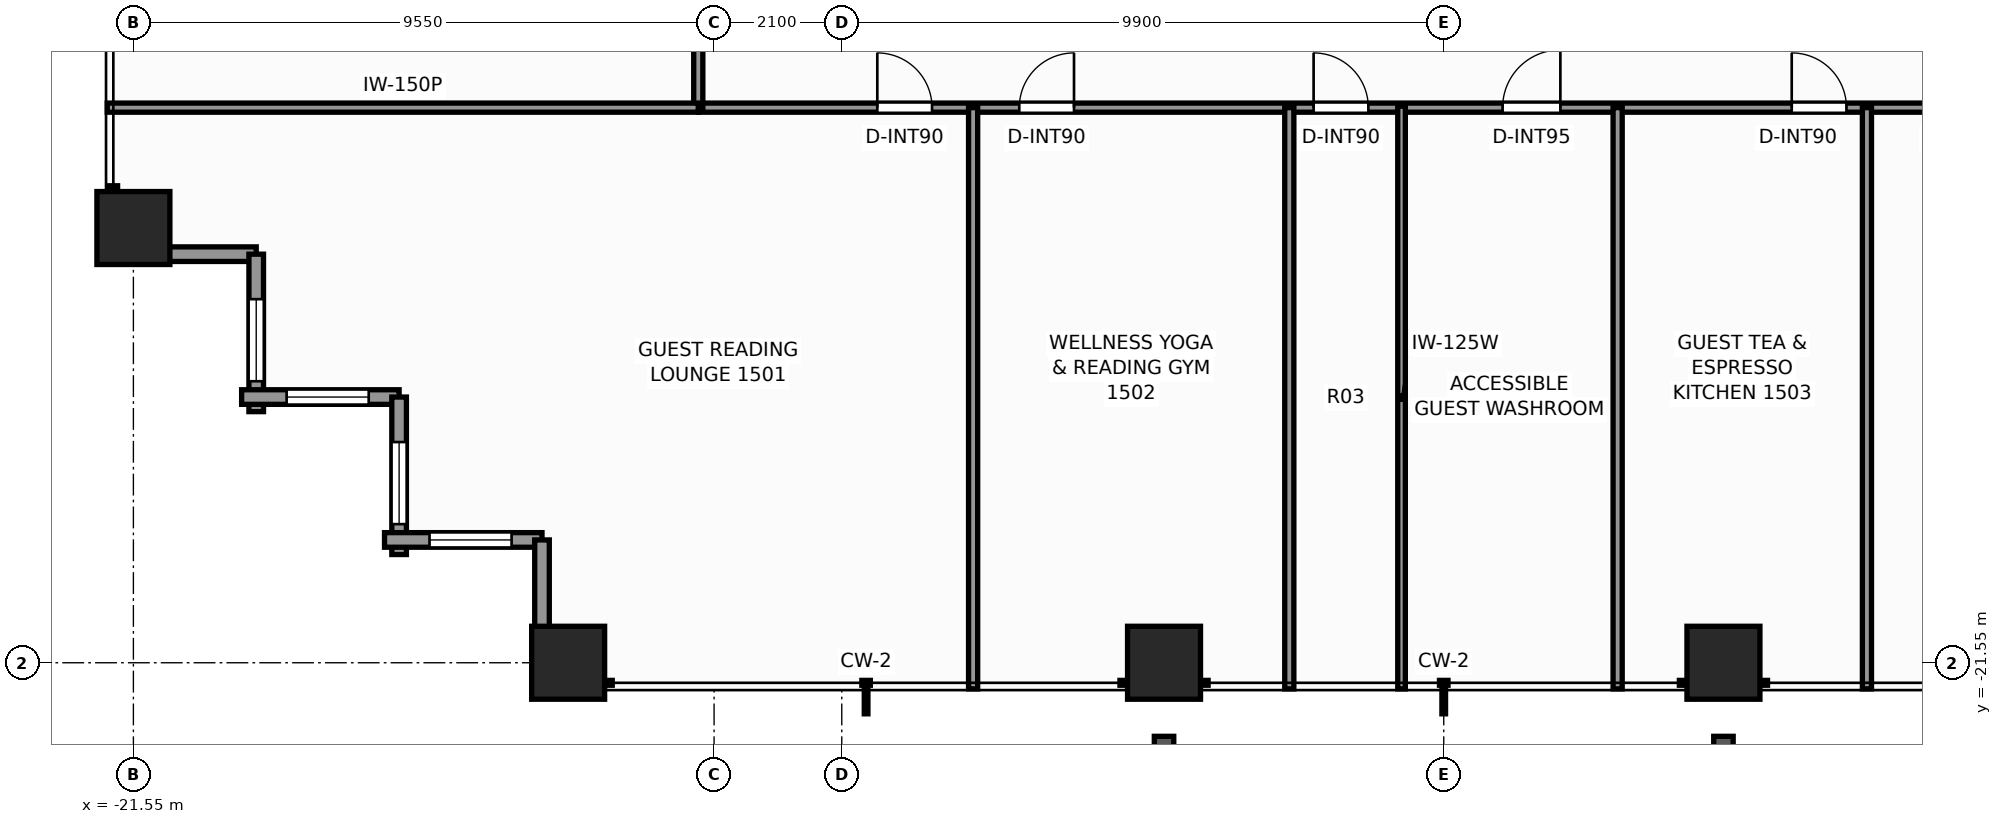
"""IFC4 building model, lengths in metres.
Left out: names, types, materials, properties, quantities, classifications, styles, units other than length and angle.
Written with IfcOpenShell. Run it as: python <this file> out.ifc"""

import sys

from ifc_helpers import new_model, si_unit, direction, frame, frame_2d, origin, origin_2d, place, context, subcontext, project, spatial, rectangle, extrude, element, fill, save


model = new_model("IFC4")
c1 = context("Model", 3, precision=1e-05, world=origin(), true_north=direction((0.0, 1.0)))
c2 = subcontext(c1, "Body", "Model", "MODEL_VIEW")
j1 = project(units=[si_unit("LENGTHUNIT", "METRE"), si_unit("PLANEANGLEUNIT", "RADIAN")], contexts=[c1])
p1 = place(None, origin())
s1 = spatial("IfcSite", under=j1, at=p1, CompositionType="ELEMENT")
p2 = place(p1, origin())
s2 = spatial("IfcBuilding", under=s1, at=p2, CompositionType="ELEMENT")
p3 = place(p2, frame((0.0, 0.0, 53.5)))
s3 = spatial("IfcBuildingStorey", under=s2, at=p3, CompositionType="ELEMENT", Elevation=53.5)
for number, where, z_axis, x_axis in (
    (1, (-14.4, -21.55, 0.0), (0.0, 0.0, 1.0), (1.0, 0.0, 0.0)),
    (2, (-4.6, -21.55, 0.0), (0.0, 0.0, 1.0), (1.0, 0.0, 0.0)),
    (3, (4.6, -21.55, 0.0), (0.0, 0.0, 1.0), (1.0, 0.0, 0.0)),
    (4, (-21.55, -14.4, 0.0), (0.0, 0.0, 1.0), (1.0, 0.0, 0.0)),
):
    element("IfcColumn", number, at=place(p3, frame(where, z_axis=z_axis, x_axis=x_axis)), inside=s3, PredefinedType="COLUMN", context=c2, shape_type="SweptSolid", body=[
        extrude(rectangle(XDim=1.2, YDim=1.2, at=origin_2d()), origin(), (0.0, 0.0, 1.0), 3.3),
    ])
p4 = place(p3, frame((-19.53, -14.83, 0.0), z_axis=(0.0, 0.0, 1.0), x_axis=(-1.0, 0.0, 0.0)))
e5 = element("IfcWall", 5, at=p4, inside=s3, PredefinedType="STANDARD", context=c2, shape_type="SweptSolid", body=[
    extrude(rectangle(XDim=2.59, YDim=0.24, at=frame_2d((1.295, 0.0))), origin(), (0.0, 0.0, 1.0), 2.439),
])
p5 = place(p3, frame((-19.53, -17.42, 0.0), z_axis=(0.0, 0.0, 1.0), x_axis=(0.0, 1.0, 0.0)))
e6 = element("IfcWall", 6, at=p5, inside=s3, PredefinedType="STANDARD", context=c2, shape_type="SweptSolid", body=[
    extrude(rectangle(XDim=2.59, YDim=0.24, at=frame_2d((1.295, 0.0))), origin(), (0.0, 0.0, 1.0), 2.439),
])
p6 = place(p5, frame((0.5, 0.0, 0.65)))
e7 = element("IfcOpeningElement", 7, at=p6, cuts=e6, PredefinedType="OPENING", context=c2, shape_type="SweptSolid", body=[
    extrude(rectangle(XDim=1.35, YDim=1.55, at=frame_2d((0.675, 0.775))), frame((0.0, 0.13, 0.0), z_axis=(0.0, -1.0, 0.0), x_axis=(1.0, 0.0, 0.0)), (0.0, 0.0, 1.0), 0.26),
])
p7 = place(p3, frame((-17.18, -17.18, 0.0), z_axis=(0.0, 0.0, 1.0), x_axis=(-1.0, 0.0, 0.0)))
e8 = element("IfcWall", 8, at=p7, inside=s3, PredefinedType="STANDARD", context=c2, shape_type="SweptSolid", body=[
    extrude(rectangle(XDim=2.59, YDim=0.24, at=frame_2d((1.295, 0.0))), origin(), (0.0, 0.0, 1.0), 2.439),
])
p8 = place(p7, frame((0.5, 0.0, 0.65)))
e9 = element("IfcOpeningElement", 9, at=p8, cuts=e8, PredefinedType="OPENING", context=c2, shape_type="SweptSolid", body=[
    extrude(rectangle(XDim=1.35, YDim=1.55, at=frame_2d((0.675, 0.775))), frame((0.0, 0.13, 0.0), z_axis=(0.0, -1.0, 0.0), x_axis=(1.0, 0.0, 0.0)), (0.0, 0.0, 1.0), 0.26),
])
p9 = place(p3, frame((-17.18, -19.77, 0.0), z_axis=(0.0, 0.0, 1.0), x_axis=(0.0, 1.0, 0.0)))
e10 = element("IfcWall", 10, at=p9, inside=s3, PredefinedType="STANDARD", context=c2, shape_type="SweptSolid", body=[
    extrude(rectangle(XDim=2.59, YDim=0.24, at=frame_2d((1.295, 0.0))), origin(), (0.0, 0.0, 1.0), 2.439),
])
p10 = place(p9, frame((0.5, 0.0, 0.65)))
e11 = element("IfcOpeningElement", 11, at=p10, cuts=e10, PredefinedType="OPENING", context=c2, shape_type="SweptSolid", body=[
    extrude(rectangle(XDim=1.35, YDim=1.55, at=frame_2d((0.675, 0.775))), frame((0.0, 0.13, 0.0), z_axis=(0.0, -1.0, 0.0), x_axis=(1.0, 0.0, 0.0)), (0.0, 0.0, 1.0), 0.26),
])
p11 = place(p3, frame((-14.83, -19.53, 0.0), z_axis=(0.0, 0.0, 1.0), x_axis=(-1.0, 0.0, 0.0)))
e12 = element("IfcWall", 12, at=p11, inside=s3, PredefinedType="STANDARD", context=c2, shape_type="SweptSolid", body=[
    extrude(rectangle(XDim=2.59, YDim=0.24, at=frame_2d((1.295, 0.0))), origin(), (0.0, 0.0, 1.0), 2.439),
])
p12 = place(p11, frame((0.5, 0.0, 0.65)))
e13 = element("IfcOpeningElement", 13, at=p12, cuts=e12, PredefinedType="OPENING", context=c2, shape_type="SweptSolid", body=[
    extrude(rectangle(XDim=1.35, YDim=1.55, at=frame_2d((0.675, 0.775))), frame((0.0, 0.13, 0.0), z_axis=(0.0, -1.0, 0.0), x_axis=(1.0, 0.0, 0.0)), (0.0, 0.0, 1.0), 0.26),
])
p13 = place(p3, frame((-14.83, -22.12, 0.0), z_axis=(0.0, 0.0, 1.0), x_axis=(0.0, 1.0, 0.0)))
e14 = element("IfcWall", 14, at=p13, inside=s3, PredefinedType="STANDARD", context=c2, shape_type="SweptSolid", body=[
    extrude(rectangle(XDim=2.59, YDim=0.24, at=frame_2d((1.295, 0.0))), origin(), (0.0, 0.0, 1.0), 2.439),
])
p14 = place(p3, frame((-12.26, -12.42, 0.0), z_axis=(0.0, 0.0, 1.0), x_axis=(1.0, 0.0, 0.0)))
e15 = element("IfcWall", 15, at=p14, inside=s3, PredefinedType="PARTITIONING", context=c2, shape_type="SweptSolid", body=[
    extrude(rectangle(XDim=24.84, YDim=0.15, at=frame_2d((12.42, 0.0))), origin(), (0.0, 0.0, 1.0), 2.272),
])
p15 = place(p14, frame((2.944, 0.0, 0.0)))
e16 = element("IfcOpeningElement", 16, at=p15, cuts=e15, PredefinedType="OPENING", context=c2, shape_type="SweptSolid", body=[
    extrude(rectangle(XDim=0.9, YDim=2.06, at=frame_2d((0.45, 1.03))), frame((0.0, 0.085, 0.0), z_axis=(0.0, -1.0, 0.0), x_axis=(1.0, 0.0, 0.0)), (0.0, 0.0, 1.0), 0.17),
])
p16 = place(p14, frame((5.279, 0.0, 0.0)))
e17 = element("IfcOpeningElement", 17, at=p16, cuts=e15, PredefinedType="OPENING", context=c2, shape_type="SweptSolid", body=[
    extrude(rectangle(XDim=0.9, YDim=2.06, at=frame_2d((0.45, 1.03))), frame((0.0, 0.085, 0.0), z_axis=(0.0, -1.0, 0.0), x_axis=(1.0, 0.0, 0.0)), (0.0, 0.0, 1.0), 0.17),
])
p17 = place(p14, frame((10.12, 0.0, 0.0)))
e18 = element("IfcOpeningElement", 18, at=p17, cuts=e15, PredefinedType="OPENING", context=c2, shape_type="SweptSolid", body=[
    extrude(rectangle(XDim=0.9, YDim=2.06, at=frame_2d((0.45, 1.03))), frame((0.0, 0.085, 0.0), z_axis=(0.0, -1.0, 0.0), x_axis=(1.0, 0.0, 0.0)), (0.0, 0.0, 1.0), 0.17),
])
p18 = place(p14, frame((13.228, 0.0, 0.0)))
e19 = element("IfcOpeningElement", 19, at=p18, cuts=e15, PredefinedType="OPENING", context=c2, shape_type="SweptSolid", body=[
    extrude(rectangle(XDim=0.95, YDim=2.06, at=frame_2d((0.475, 1.03))), frame((0.0, 0.085, 0.0), z_axis=(0.0, -1.0, 0.0), x_axis=(1.0, 0.0, 0.0)), (0.0, 0.0, 1.0), 0.17),
])
p19 = place(p14, frame((17.983, 0.0, 0.0)))
e20 = element("IfcOpeningElement", 20, at=p19, cuts=e15, PredefinedType="OPENING", context=c2, shape_type="SweptSolid", body=[
    extrude(rectangle(XDim=0.9, YDim=2.06, at=frame_2d((0.45, 1.03))), frame((0.0, 0.085, 0.0), z_axis=(0.0, -1.0, 0.0), x_axis=(1.0, 0.0, 0.0)), (0.0, 0.0, 1.0), 0.17),
])
p20 = place(p14, frame((20.318, 0.0, 0.0)))
e21 = element("IfcOpeningElement", 21, at=p20, cuts=e15, PredefinedType="OPENING", context=c2, shape_type="SweptSolid", body=[
    extrude(rectangle(XDim=0.9, YDim=2.06, at=frame_2d((0.45, 1.03))), frame((0.0, 0.085, 0.0), z_axis=(0.0, -1.0, 0.0), x_axis=(1.0, 0.0, 0.0)), (0.0, 0.0, 1.0), 0.17),
])
p21 = place(p3, frame((-12.26, -12.42, 0.0), z_axis=(0.0, 0.0, 1.0), x_axis=(0.0, 1.0, 0.0)))
e22 = element("IfcWall", 22, at=p21, inside=s3, PredefinedType="PARTITIONING", context=c2, shape_type="SweptSolid", body=[
    extrude(rectangle(XDim=24.84, YDim=0.15, at=frame_2d((12.42, 0.0))), origin(), (0.0, 0.0, 1.0), 2.272),
])
p22 = place(p21, frame((3.551, 0.0, 0.0)))
e23 = element("IfcOpeningElement", 23, at=p22, cuts=e22, PredefinedType="OPENING", context=c2, shape_type="SweptSolid", body=[
    extrude(rectangle(XDim=0.95, YDim=2.06, at=frame_2d((0.475, 1.03))), frame((0.0, 0.085, 0.0), z_axis=(0.0, -1.0, 0.0), x_axis=(1.0, 0.0, 0.0)), (0.0, 0.0, 1.0), 0.17),
])
p23 = place(p21, frame((9.94, 0.0, 0.0)))
e24 = element("IfcOpeningElement", 24, at=p23, cuts=e22, PredefinedType="OPENING", context=c2, shape_type="SweptSolid", body=[
    extrude(rectangle(XDim=0.9, YDim=2.06, at=frame_2d((0.45, 1.03))), frame((0.0, 0.085, 0.0), z_axis=(0.0, -1.0, 0.0), x_axis=(1.0, 0.0, 0.0)), (0.0, 0.0, 1.0), 0.17),
])
p24 = place(p21, frame((19.741, 0.0, 0.0)))
e25 = element("IfcOpeningElement", 25, at=p24, cuts=e22, PredefinedType="OPENING", context=c2, shape_type="SweptSolid", body=[
    extrude(rectangle(XDim=0.95, YDim=2.06, at=frame_2d((0.475, 1.03))), frame((0.0, 0.085, 0.0), z_axis=(0.0, -1.0, 0.0), x_axis=(1.0, 0.0, 0.0)), (0.0, 0.0, 1.0), 0.17),
])
p25 = place(p3, frame((-21.98, -12.42, 0.0), z_axis=(0.0, 0.0, 1.0), x_axis=(1.0, 0.0, 0.0)))
e26 = element("IfcWall", 26, at=p25, inside=s3, PredefinedType="PARTITIONING", context=c2, shape_type="SweptSolid", body=[
    extrude(rectangle(XDim=9.72, YDim=0.15, at=frame_2d((4.86, 0.0))), origin(), (0.0, 0.0, 1.0), 2.272),
])
for number, where, z_axis, x_axis in (
    (27, (-7.74, -21.98, 0.0), (0.0, 0.0, 1.0), (0.0, 1.0, 0.0)),
    (28, (-2.54, -21.98, 0.0), (0.0, 0.0, 1.0), (0.0, 1.0, 0.0)),
):
    element("IfcWall", number, at=place(p3, frame(where, z_axis=z_axis, x_axis=x_axis)), inside=s3, PredefinedType="PARTITIONING", context=c2, shape_type="SweptSolid", body=[
        extrude(rectangle(XDim=9.56, YDim=0.15, at=frame_2d((4.78, 0.0))), origin(), (0.0, 0.0, 1.0), 2.429),
    ])
p26 = place(p3, frame((2.86, -21.98, 0.0), z_axis=(0.0, 0.0, 1.0), x_axis=(0.0, 1.0, 0.0)))
e29 = element("IfcWall", 29, at=p26, inside=s3, PredefinedType="PARTITIONING", context=c2, shape_type="SweptSolid", body=[
    extrude(rectangle(XDim=9.56, YDim=0.15, at=frame_2d((4.78, 0.0))), origin(), (0.0, 0.0, 1.0), 2.349),
])
p27 = place(p3, frame((-0.694, -21.98, 0.0), z_axis=(0.0, 0.0, 1.0), x_axis=(0.0, 1.0, 0.0)))
e30 = element("IfcWall", 30, at=p27, inside=s3, PredefinedType="PARTITIONING", context=c2, shape_type="SweptSolid", body=[
    extrude(rectangle(XDim=9.585, YDim=0.125, at=frame_2d((4.792, 0.0))), origin(), (0.0, 0.0, 1.0), 2.429),
])
p28 = place(p3, frame((6.96, -21.98, 0.0), z_axis=(0.0, 0.0, 1.0), x_axis=(0.0, 1.0, 0.0)))
e31 = element("IfcWall", 31, at=p28, inside=s3, PredefinedType="PARTITIONING", context=c2, shape_type="SweptSolid", body=[
    extrude(rectangle(XDim=9.56, YDim=0.15, at=frame_2d((4.78, 0.0))), origin(), (0.0, 0.0, 1.0), 2.429),
])
p29 = place(p6, origin())
e32 = element("IfcWindow", 32, at=p29, inside=s3, PartitioningType="SINGLE_PANEL", PredefinedType="WINDOW", context=c2, shape_type="SweptSolid", body=[
    extrude(rectangle(XDim=1.35, YDim=1.55, at=frame_2d((0.675, 0.775))), frame((0.0, 0.03, 0.0), z_axis=(0.0, -1.0, 0.0), x_axis=(1.0, 0.0, 0.0)), (0.0, 0.0, 1.0), 0.06),
])
fill(e7, e32)
p30 = place(p8, origin())
e33 = element("IfcWindow", 33, at=p30, inside=s3, PartitioningType="SINGLE_PANEL", PredefinedType="WINDOW", context=c2, shape_type="SweptSolid", body=[
    extrude(rectangle(XDim=1.35, YDim=1.55, at=frame_2d((0.675, 0.775))), frame((0.0, 0.03, 0.0), z_axis=(0.0, -1.0, 0.0), x_axis=(1.0, 0.0, 0.0)), (0.0, 0.0, 1.0), 0.06),
])
fill(e9, e33)
p31 = place(p10, origin())
e34 = element("IfcWindow", 34, at=p31, inside=s3, PartitioningType="SINGLE_PANEL", PredefinedType="WINDOW", context=c2, shape_type="SweptSolid", body=[
    extrude(rectangle(XDim=1.35, YDim=1.55, at=frame_2d((0.675, 0.775))), frame((0.0, 0.03, 0.0), z_axis=(0.0, -1.0, 0.0), x_axis=(1.0, 0.0, 0.0)), (0.0, 0.0, 1.0), 0.06),
])
fill(e11, e34)
p32 = place(p12, origin())
e35 = element("IfcWindow", 35, at=p32, inside=s3, PartitioningType="SINGLE_PANEL", PredefinedType="WINDOW", context=c2, shape_type="SweptSolid", body=[
    extrude(rectangle(XDim=1.35, YDim=1.55, at=frame_2d((0.675, 0.775))), frame((0.0, 0.03, 0.0), z_axis=(0.0, -1.0, 0.0), x_axis=(1.0, 0.0, 0.0)), (0.0, 0.0, 1.0), 0.06),
])
fill(e13, e35)
p33 = place(p15, origin())
e36 = element("IfcDoor", 36, at=p33, inside=s3, OperationType="SINGLE_SWING_LEFT", PredefinedType="DOOR", context=c2, shape_type="SweptSolid", body=[
    extrude(rectangle(XDim=0.9, YDim=2.06, at=frame_2d((0.45, 1.03))), frame((0.0, 0.025, 0.0), z_axis=(0.0, -1.0, 0.0), x_axis=(1.0, 0.0, 0.0)), (0.0, 0.0, 1.0), 0.05),
])
fill(e16, e36)
p34 = place(p16, origin())
e37 = element("IfcDoor", 37, at=p34, inside=s3, OperationType="SINGLE_SWING_RIGHT", PredefinedType="DOOR", context=c2, shape_type="SweptSolid", body=[
    extrude(rectangle(XDim=0.9, YDim=2.06, at=frame_2d((0.45, 1.03))), frame((0.0, 0.025, 0.0), z_axis=(0.0, -1.0, 0.0), x_axis=(1.0, 0.0, 0.0)), (0.0, 0.0, 1.0), 0.05),
])
fill(e17, e37)
p35 = place(p17, origin())
e38 = element("IfcDoor", 38, at=p35, inside=s3, OperationType="SINGLE_SWING_LEFT", PredefinedType="DOOR", context=c2, shape_type="SweptSolid", body=[
    extrude(rectangle(XDim=0.9, YDim=2.06, at=frame_2d((0.45, 1.03))), frame((0.0, 0.025, 0.0), z_axis=(0.0, -1.0, 0.0), x_axis=(1.0, 0.0, 0.0)), (0.0, 0.0, 1.0), 0.05),
])
fill(e18, e38)
p36 = place(p18, origin())
e39 = element("IfcDoor", 39, at=p36, inside=s3, OperationType="SINGLE_SWING_RIGHT", PredefinedType="DOOR", context=c2, shape_type="SweptSolid", body=[
    extrude(rectangle(XDim=0.95, YDim=2.06, at=frame_2d((0.475, 1.03))), frame((0.0, 0.025, 0.0), z_axis=(0.0, -1.0, 0.0), x_axis=(1.0, 0.0, 0.0)), (0.0, 0.0, 1.0), 0.05),
])
fill(e19, e39)
p37 = place(p19, origin())
e40 = element("IfcDoor", 40, at=p37, inside=s3, OperationType="SINGLE_SWING_LEFT", PredefinedType="DOOR", context=c2, shape_type="SweptSolid", body=[
    extrude(rectangle(XDim=0.9, YDim=2.06, at=frame_2d((0.45, 1.03))), frame((0.0, 0.025, 0.0), z_axis=(0.0, -1.0, 0.0), x_axis=(1.0, 0.0, 0.0)), (0.0, 0.0, 1.0), 0.05),
])
fill(e20, e40)
save(model, sys.argv[1])
